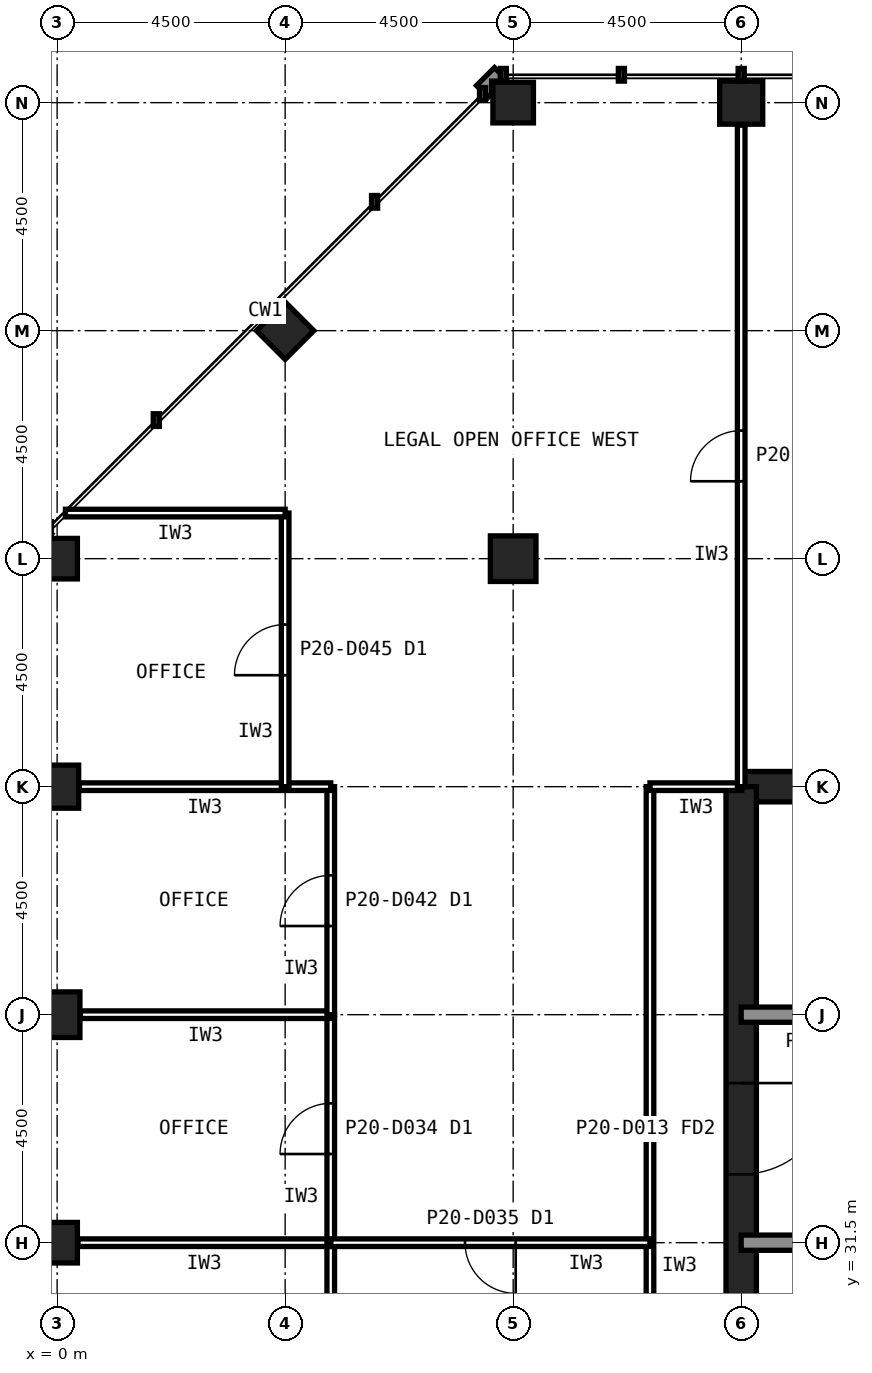
"""IFC4 building model, lengths in metres.
Left out: names, types, materials, properties, quantities, classifications, styles, units other than length and angle.
Written with IfcOpenShell. Run it as: python <this file> out.ifc"""

import sys

from ifc_helpers import new_model, si_unit, direction, frame, frame_2d, origin, origin_2d, place, context, subcontext, project, spatial, rectangle, hollow_rectangle, extrude, element, fill, save


model = new_model("IFC4")
c1 = context("Model", 3, precision=1e-05, world=origin(), true_north=direction((0.0, 1.0)))
c2 = subcontext(c1, "Body", "Model", "MODEL_VIEW")
j1 = project(units=[si_unit("LENGTHUNIT", "METRE"), si_unit("PLANEANGLEUNIT", "RADIAN")], contexts=[c1])
p1 = place(None, origin())
s1 = spatial("IfcSite", under=j1, at=p1, CompositionType="ELEMENT")
p2 = place(p1, origin())
s2 = spatial("IfcBuilding", under=s1, at=p2, CompositionType="ELEMENT")
p3 = place(p2, frame((0.0, 0.0, 87.8)))
s3 = spatial("IfcBuildingStorey", under=s2, at=p3, CompositionType="ELEMENT", Elevation=87.8)
p4 = place(p3, frame((13.5, 54.0, 0.0), z_axis=(0.0, 0.0, 1.0), x_axis=(1.0, 0.0, 0.0)))
e1 = element("IfcColumn", 1, at=p4, inside=s3, PredefinedType="COLUMN", context=c2, shape_type="SweptSolid", body=[
    extrude(hollow_rectangle(XDim=0.85, YDim=0.85, WallThickness=0.05, at=origin_2d()), origin(), (0.0, 0.0, 1.0), 4.2),
])
for number, where, z_axis, x_axis in (
    (2, (9.0, 54.0, 0.0), (0.0, 0.0, 1.0), (1.0, 0.0, 0.0)),
    (3, (0.0, 45.0, 0.0), (0.0, 0.0, 1.0), (1.0, 0.0, 0.0)),
):
    element("IfcColumn", number, at=place(p3, frame(where, z_axis=z_axis, x_axis=x_axis)), inside=s3, PredefinedType="COLUMN", context=c2, shape_type="SweptSolid", body=[
        extrude(hollow_rectangle(XDim=0.8, YDim=0.8, WallThickness=0.045, at=origin_2d()), origin(), (0.0, 0.0, 1.0), 4.2),
    ])
p5 = place(p3, frame((0.0, 40.5, 0.0), z_axis=(0.0, 0.0, 1.0), x_axis=(1.0, 0.0, 0.0)))
e4 = element("IfcColumn", 4, at=p5, inside=s3, PredefinedType="COLUMN", context=c2, shape_type="SweptSolid", body=[
    extrude(hollow_rectangle(XDim=0.85, YDim=0.85, WallThickness=0.05, at=origin_2d()), origin(), (0.0, 0.0, 1.0), 4.2),
])
p6 = place(p3, frame((0.0, 36.0, 0.0), z_axis=(0.0, 0.0, 1.0), x_axis=(1.0, 0.0, 0.0)))
e5 = element("IfcColumn", 5, at=p6, inside=s3, PredefinedType="COLUMN", context=c2, shape_type="SweptSolid", body=[
    extrude(hollow_rectangle(XDim=0.9, YDim=0.9, WallThickness=0.063, at=origin_2d()), origin(), (0.0, 0.0, 1.0), 4.2),
])
for number, where, z_axis, x_axis in (
    (6, (0.0, 31.5, 0.0), (0.0, 0.0, 1.0), (1.0, 0.0, 0.0)),
    (7, (4.5, 49.5, 0.0), (0.0, 0.0, 1.0), (0.707, 0.707, 0.0)),
):
    element("IfcColumn", number, at=place(p3, frame(where, z_axis=z_axis, x_axis=x_axis)), inside=s3, PredefinedType="COLUMN", context=c2, shape_type="SweptSolid", body=[
        extrude(hollow_rectangle(XDim=0.8, YDim=0.8, WallThickness=0.045, at=origin_2d()), origin(), (0.0, 0.0, 1.0), 4.2),
    ])
p7 = place(p3, frame((9.0, 45.0, 0.0), z_axis=(0.0, 0.0, 1.0), x_axis=(1.0, 0.0, 0.0)))
e8 = element("IfcColumn", 8, at=p7, inside=s3, PredefinedType="COLUMN", context=c2, shape_type="SweptSolid", body=[
    extrude(hollow_rectangle(XDim=0.9, YDim=0.9, WallThickness=0.063, at=origin_2d()), origin(), (0.0, 0.0, 1.0), 4.2),
])
p8 = place(p3, frame((40.5, 40.5, 0.0), z_axis=(0.0, 0.0, 1.0), x_axis=(-1.0, 0.0, 0.0)))
e9 = element("IfcWall", 9, at=p8, inside=s3, PredefinedType="SHEAR", context=c2, shape_type="SweptSolid", body=[
    extrude(rectangle(XDim=27.0, YDim=0.6, at=frame_2d((13.5, 0.0))), origin(), (0.0, 0.0, 1.0), 4.2),
])
p9 = place(p3, frame((13.5, 40.5, 0.0), z_axis=(0.0, 0.0, 1.0), x_axis=(0.0, -1.0, 0.0)))
e10 = element("IfcWall", 10, at=p9, inside=s3, PredefinedType="SHEAR", context=c2, shape_type="SweptSolid", body=[
    extrude(rectangle(XDim=27.0, YDim=0.6, at=frame_2d((13.5, 0.0))), origin(), (0.0, 0.0, 1.0), 4.2),
])
p10 = place(p9, frame((19.65, 0.0, 0.0)))
e11 = element("IfcOpeningElement", 11, at=p10, cuts=e10, PredefinedType="OPENING", context=c2, shape_type="SweptSolid", body=[
    extrude(rectangle(XDim=1.2, YDim=2.1, at=frame_2d((0.6, 1.05))), frame((0.0, 0.31, 0.0), z_axis=(0.0, -1.0, 0.0), x_axis=(1.0, 0.0, 0.0)), (0.0, 0.0, 1.0), 0.62),
])
p11 = place(p9, frame((5.85, 0.0, 0.0)))
e12 = element("IfcOpeningElement", 12, at=p11, cuts=e10, PredefinedType="OPENING", context=c2, shape_type="SweptSolid", body=[
    extrude(rectangle(XDim=1.8, YDim=2.1, at=frame_2d((0.9, 1.05))), frame((0.0, 0.31, 0.0), z_axis=(0.0, -1.0, 0.0), x_axis=(1.0, 0.0, 0.0)), (0.0, 0.0, 1.0), 0.62),
])
p12 = place(p3, frame((13.5, 36.0, 0.0), z_axis=(0.0, 0.0, 1.0), x_axis=(1.0, 0.0, 0.0)))
e13 = element("IfcWall", 13, at=p12, inside=s3, PredefinedType="SOLIDWALL", context=c2, shape_type="SweptSolid", body=[
    extrude(rectangle(XDim=27.0, YDim=0.3, at=frame_2d((13.5, 0.0))), origin(), (0.0, 0.0, 1.0), 4.04),
])
p13 = place(p12, frame((1.8, 0.0, 0.0)))
e14 = element("IfcOpeningElement", 14, at=p13, cuts=e13, PredefinedType="OPENING", context=c2, shape_type="SweptSolid", body=[
    extrude(rectangle(XDim=0.9, YDim=2.1, at=frame_2d((0.45, 1.05))), frame((0.0, 0.16, 0.0), z_axis=(0.0, -1.0, 0.0), x_axis=(1.0, 0.0, 0.0)), (0.0, 0.0, 1.0), 0.32),
])
p14 = place(p12, frame((24.1, 0.0, 0.0)))
e15 = element("IfcOpeningElement", 15, at=p14, cuts=e13, PredefinedType="OPENING", context=c2, shape_type="SweptSolid", body=[
    extrude(rectangle(XDim=1.3, YDim=2.2, at=frame_2d((0.65, 1.1))), frame((0.0, 0.16, 0.0), z_axis=(0.0, -1.0, 0.0), x_axis=(1.0, 0.0, 0.0)), (0.0, 0.0, 1.0), 0.32),
])
p15 = place(p3, frame((13.5, 31.5, 0.0), z_axis=(0.0, 0.0, 1.0), x_axis=(1.0, 0.0, 0.0)))
e16 = element("IfcWall", 16, at=p15, inside=s3, PredefinedType="SOLIDWALL", context=c2, shape_type="SweptSolid", body=[
    extrude(rectangle(XDim=27.0, YDim=0.3, at=frame_2d((13.5, 0.0))), origin(), (0.0, 0.0, 1.0), 4.04),
])
p16 = place(p15, frame((24.15, 0.0, 0.0)))
e17 = element("IfcOpeningElement", 17, at=p16, cuts=e16, PredefinedType="OPENING", context=c2, shape_type="SweptSolid", body=[
    extrude(rectangle(XDim=1.2, YDim=2.1, at=frame_2d((0.6, 1.05))), frame((0.0, 0.16, 0.0), z_axis=(0.0, -1.0, 0.0), x_axis=(1.0, 0.0, 0.0)), (0.0, 0.0, 1.0), 0.32),
])
p17 = place(p15, frame((15.3, 0.0, 0.0)))
e18 = element("IfcOpeningElement", 18, at=p17, cuts=e16, PredefinedType="OPENING", context=c2, shape_type="SweptSolid", body=[
    extrude(rectangle(XDim=0.9, YDim=2.1, at=frame_2d((0.45, 1.05))), frame((0.0, 0.16, 0.0), z_axis=(0.0, -1.0, 0.0), x_axis=(1.0, 0.0, 0.0)), (0.0, 0.0, 1.0), 0.32),
])
p18 = place(p15, frame((19.8, 0.0, 0.0)))
e19 = element("IfcOpeningElement", 19, at=p18, cuts=e16, PredefinedType="OPENING", context=c2, shape_type="SweptSolid", body=[
    extrude(rectangle(XDim=0.9, YDim=2.1, at=frame_2d((0.45, 1.05))), frame((0.0, 0.16, 0.0), z_axis=(0.0, -1.0, 0.0), x_axis=(1.0, 0.0, 0.0)), (0.0, 0.0, 1.0), 0.32),
])
p19 = place(p3, frame((11.7, 40.5, 0.0), z_axis=(0.0, 0.0, 1.0), x_axis=(0.0, -1.0, 0.0)))
e20 = element("IfcWall", 20, at=p19, inside=s3, PredefinedType="PARTITIONING", context=c2, shape_type="SweptSolid", body=[
    extrude(rectangle(XDim=27.0, YDim=0.15, at=frame_2d((13.5, 0.0))), origin(), (0.0, 0.0, 1.0), 4.04),
])
p20 = place(p19, frame((13.0, 0.0, 0.0)))
e21 = element("IfcOpeningElement", 21, at=p20, cuts=e20, PredefinedType="OPENING", context=c2, shape_type="SweptSolid", body=[
    extrude(rectangle(XDim=1.0, YDim=2.1, at=frame_2d((0.5, 1.05))), frame((0.0, 0.085, 0.0), z_axis=(0.0, -1.0, 0.0), x_axis=(1.0, 0.0, 0.0)), (0.0, 0.0, 1.0), 0.17),
])
p21 = place(p3, frame((13.51, 40.5, 0.0), z_axis=(0.0, 0.0, 1.0), x_axis=(-1.0, 0.0, 0.0)))
e22 = element("IfcWall", 22, at=p21, inside=s3, PredefinedType="PARTITIONING", context=c2, shape_type="SweptSolid", body=[
    extrude(rectangle(XDim=1.81, YDim=0.15, at=frame_2d((0.905, 0.0))), origin(), (0.0, 0.0, 1.0), 3.189),
])
p22 = place(p3, frame((5.4, 27.0, 0.0), z_axis=(0.0, 0.0, 1.0), x_axis=(0.0, 1.0, 0.0)))
e23 = element("IfcWall", 23, at=p22, inside=s3, PredefinedType="PARTITIONING", context=c2, shape_type="SweptSolid", body=[
    extrude(rectangle(XDim=4.5, YDim=0.15, at=frame_2d((2.25, 0.0))), origin(), (0.0, 0.0, 1.0), 4.04),
])
p23 = place(p22, frame((1.75, 0.0, 0.0)))
e24 = element("IfcOpeningElement", 24, at=p23, cuts=e23, PredefinedType="OPENING", context=c2, shape_type="SweptSolid", body=[
    extrude(rectangle(XDim=1.0, YDim=2.1, at=frame_2d((0.5, 1.05))), frame((0.0, 0.085, 0.0), z_axis=(0.0, -1.0, 0.0), x_axis=(1.0, 0.0, 0.0)), (0.0, 0.0, 1.0), 0.17),
])
p24 = place(p3, frame((5.4, 31.5, 0.0), z_axis=(0.0, 0.0, 1.0), x_axis=(-1.0, 0.0, 0.0)))
e25 = element("IfcWall", 25, at=p24, inside=s3, PredefinedType="PARTITIONING", context=c2, shape_type="SweptSolid", body=[
    extrude(rectangle(XDim=4.99, YDim=0.15, at=frame_2d((2.495, 0.0))), origin(), (0.0, 0.0, 1.0), 3.189),
])
p25 = place(p3, frame((5.4, 31.5, 0.0), z_axis=(0.0, 0.0, 1.0), x_axis=(0.0, 1.0, 0.0)))
e26 = element("IfcWall", 26, at=p25, inside=s3, PredefinedType="PARTITIONING", context=c2, shape_type="SweptSolid", body=[
    extrude(rectangle(XDim=4.5, YDim=0.15, at=frame_2d((2.25, 0.0))), origin(), (0.0, 0.0, 1.0), 4.04),
])
p26 = place(p25, frame((1.75, 0.0, 0.0)))
e27 = element("IfcOpeningElement", 27, at=p26, cuts=e26, PredefinedType="OPENING", context=c2, shape_type="SweptSolid", body=[
    extrude(rectangle(XDim=1.0, YDim=2.1, at=frame_2d((0.5, 1.05))), frame((0.0, 0.085, 0.0), z_axis=(0.0, -1.0, 0.0), x_axis=(1.0, 0.0, 0.0)), (0.0, 0.0, 1.0), 0.17),
])
p27 = place(p3, frame((5.4, 36.0, 0.0), z_axis=(0.0, 0.0, 1.0), x_axis=(-1.0, 0.0, 0.0)))
e28 = element("IfcWall", 28, at=p27, inside=s3, PredefinedType="PARTITIONING", context=c2, shape_type="SweptSolid", body=[
    extrude(rectangle(XDim=4.94, YDim=0.15, at=frame_2d((2.47, 0.0))), origin(), (0.0, 0.0, 1.0), 3.189),
])
p28 = place(p3, frame((5.4, 36.0, 0.0), z_axis=(0.0, 0.0, 1.0), x_axis=(0.0, 1.0, 0.0)))
e29 = element("IfcWall", 29, at=p28, inside=s3, PredefinedType="PARTITIONING", context=c2, shape_type="SweptSolid", body=[
    extrude(rectangle(XDim=4.5, YDim=0.15, at=frame_2d((2.25, 0.0))), origin(), (0.0, 0.0, 1.0), 4.04),
])
p29 = place(p28, frame((1.75, 0.0, 0.0)))
e30 = element("IfcOpeningElement", 30, at=p29, cuts=e29, PredefinedType="OPENING", context=c2, shape_type="SweptSolid", body=[
    extrude(rectangle(XDim=1.0, YDim=2.1, at=frame_2d((0.5, 1.05))), frame((0.0, 0.085, 0.0), z_axis=(0.0, -1.0, 0.0), x_axis=(1.0, 0.0, 0.0)), (0.0, 0.0, 1.0), 0.17),
])
p30 = place(p3, frame((5.4, 40.5, 0.0), z_axis=(0.0, 0.0, 1.0), x_axis=(-1.0, 0.0, 0.0)))
e31 = element("IfcWall", 31, at=p30, inside=s3, PredefinedType="PARTITIONING", context=c2, shape_type="SweptSolid", body=[
    extrude(rectangle(XDim=4.965, YDim=0.15, at=frame_2d((2.482, 0.0))), origin(), (0.0, 0.0, 1.0), 3.189),
])
p31 = place(p3, frame((4.5, 40.5, 0.0), z_axis=(0.0, 0.0, 1.0), x_axis=(0.0, 1.0, 0.0)))
e32 = element("IfcWall", 32, at=p31, inside=s3, PredefinedType="PARTITIONING", context=c2, shape_type="SweptSolid", body=[
    extrude(rectangle(XDim=5.4, YDim=0.15, at=frame_2d((2.7, 0.0))), origin(), (0.0, 0.0, 1.0), 4.04),
])
p32 = place(p31, frame((2.2, 0.0, 0.0)))
e33 = element("IfcOpeningElement", 33, at=p32, cuts=e32, PredefinedType="OPENING", context=c2, shape_type="SweptSolid", body=[
    extrude(rectangle(XDim=1.0, YDim=2.1, at=frame_2d((0.5, 1.05))), frame((0.0, 0.085, 0.0), z_axis=(0.0, -1.0, 0.0), x_axis=(1.0, 0.0, 0.0)), (0.0, 0.0, 1.0), 0.17),
])
p33 = place(p3, frame((4.5, 45.9, 0.0), z_axis=(0.0, 0.0, 1.0), x_axis=(-1.0, 0.0, 0.0)))
e34 = element("IfcWall", 34, at=p33, inside=s3, PredefinedType="PARTITIONING", context=c2, shape_type="SweptSolid", body=[
    extrude(rectangle(XDim=4.335, YDim=0.15, at=frame_2d((2.168, 0.0))), origin(), (0.0, 0.0, 1.0), 4.04),
])
p34 = place(p3, frame((13.5, 40.5, 0.0), z_axis=(0.0, 0.0, 1.0), x_axis=(0.0, 1.0, 0.0)))
e35 = element("IfcWall", 35, at=p34, inside=s3, PredefinedType="PARTITIONING", context=c2, shape_type="SweptSolid", body=[
    extrude(rectangle(XDim=13.055, YDim=0.15, at=frame_2d((6.527, 0.0))), origin(), (0.0, 0.0, 1.0), 3.189),
])
p35 = place(p34, frame((6.028, 0.0, 0.0)))
e36 = element("IfcOpeningElement", 36, at=p35, cuts=e35, PredefinedType="OPENING", context=c2, shape_type="SweptSolid", body=[
    extrude(rectangle(XDim=1.0, YDim=2.1, at=frame_2d((0.5, 1.05))), frame((0.0, 0.085, 0.0), z_axis=(0.0, -1.0, 0.0), x_axis=(1.0, 0.0, 0.0)), (0.0, 0.0, 1.0), 0.17),
])
p36 = place(p3, frame((11.7, 31.5, 0.0), z_axis=(0.0, 0.0, 1.0), x_axis=(-1.0, 0.0, 0.0)))
e37 = element("IfcWall", 37, at=p36, inside=s3, PredefinedType="PARTITIONING", context=c2, shape_type="SweptSolid", body=[
    extrude(rectangle(XDim=6.3, YDim=0.15, at=frame_2d((3.15, 0.0))), origin(), (0.0, 0.0, 1.0), 3.189),
])
p37 = place(p36, frame((2.65, 0.0, 0.0)))
e38 = element("IfcOpeningElement", 38, at=p37, cuts=e37, PredefinedType="OPENING", context=c2, shape_type="SweptSolid", body=[
    extrude(rectangle(XDim=1.0, YDim=2.1, at=frame_2d((0.5, 1.05))), frame((0.0, 0.085, 0.0), z_axis=(0.0, -1.0, 0.0), x_axis=(1.0, 0.0, 0.0)), (0.0, 0.0, 1.0), 0.17),
])
p38 = place(p11, origin())
e39 = element("IfcDoor", 39, at=p38, inside=s3, OperationType="SINGLE_SWING_LEFT", PredefinedType="DOOR", context=c2, shape_type="SweptSolid", body=[
    extrude(rectangle(XDim=1.8, YDim=2.1, at=frame_2d((0.9, 1.05))), frame((0.0, 0.025, 0.0), z_axis=(0.0, -1.0, 0.0), x_axis=(1.0, 0.0, 0.0)), (0.0, 0.0, 1.0), 0.05),
])
fill(e12, e39)
p39 = place(p26, origin())
e40 = element("IfcDoor", 40, at=p39, inside=s3, OperationType="SINGLE_SWING_LEFT", PredefinedType="DOOR", context=c2, shape_type="SweptSolid", body=[
    extrude(rectangle(XDim=1.0, YDim=2.1, at=frame_2d((0.5, 1.05))), frame((0.0, 0.025, 0.0), z_axis=(0.0, -1.0, 0.0), x_axis=(1.0, 0.0, 0.0)), (0.0, 0.0, 1.0), 0.05),
])
fill(e27, e40)
p40 = place(p29, origin())
e41 = element("IfcDoor", 41, at=p40, inside=s3, OperationType="SINGLE_SWING_LEFT", PredefinedType="DOOR", context=c2, shape_type="SweptSolid", body=[
    extrude(rectangle(XDim=1.0, YDim=2.1, at=frame_2d((0.5, 1.05))), frame((0.0, 0.025, 0.0), z_axis=(0.0, -1.0, 0.0), x_axis=(1.0, 0.0, 0.0)), (0.0, 0.0, 1.0), 0.05),
])
fill(e30, e41)
p41 = place(p32, origin())
e42 = element("IfcDoor", 42, at=p41, inside=s3, OperationType="SINGLE_SWING_LEFT", PredefinedType="DOOR", context=c2, shape_type="SweptSolid", body=[
    extrude(rectangle(XDim=1.0, YDim=2.1, at=frame_2d((0.5, 1.05))), frame((0.0, 0.025, 0.0), z_axis=(0.0, -1.0, 0.0), x_axis=(1.0, 0.0, 0.0)), (0.0, 0.0, 1.0), 0.05),
])
fill(e33, e42)
p42 = place(p35, origin())
e43 = element("IfcDoor", 43, at=p42, inside=s3, OperationType="SINGLE_SWING_LEFT", PredefinedType="DOOR", context=c2, shape_type="SweptSolid", body=[
    extrude(rectangle(XDim=1.0, YDim=2.1, at=frame_2d((0.5, 1.05))), frame((0.0, 0.025, 0.0), z_axis=(0.0, -1.0, 0.0), x_axis=(1.0, 0.0, 0.0)), (0.0, 0.0, 1.0), 0.05),
])
fill(e36, e43)
p43 = place(p37, origin())
e44 = element("IfcDoor", 44, at=p43, inside=s3, OperationType="SINGLE_SWING_LEFT", PredefinedType="DOOR", context=c2, shape_type="SweptSolid", body=[
    extrude(rectangle(XDim=1.0, YDim=2.1, at=frame_2d((0.5, 1.05))), frame((0.0, 0.025, 0.0), z_axis=(0.0, -1.0, 0.0), x_axis=(1.0, 0.0, 0.0)), (0.0, 0.0, 1.0), 0.05),
])
fill(e38, e44)
save(model, sys.argv[1])
